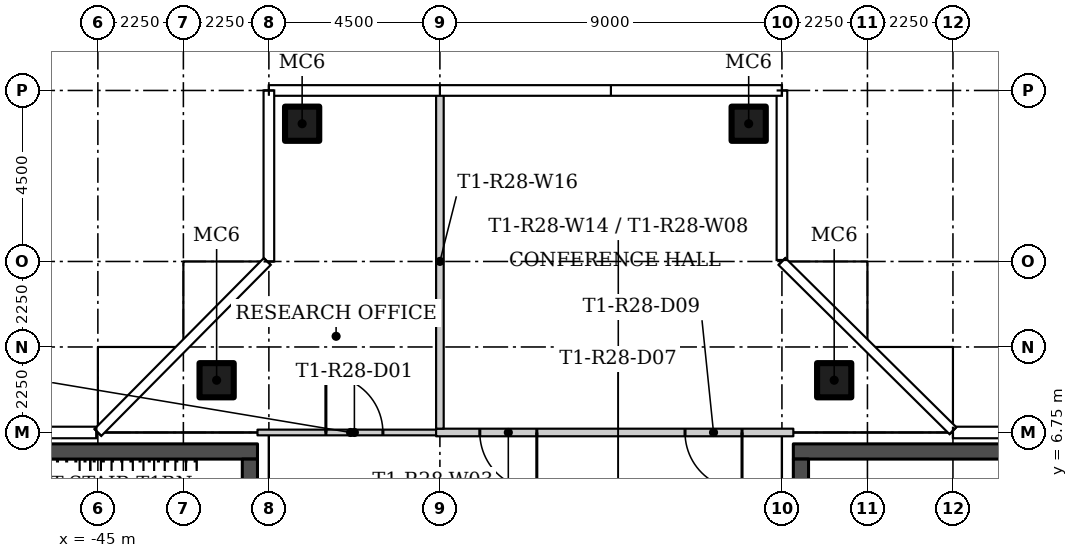
"""IFC4 building model, lengths in metres.
Left out: names, types, materials, properties, quantities, classifications, styles, units other than length and angle.
Written with IfcOpenShell. Run it as: python <this file> out.ifc"""

import sys

from ifc_helpers import new_model, si_unit, direction, frame, frame_2d, origin, origin_2d, place, context, subcontext, project, spatial, rectangle, hollow_rectangle, extrude, element, fill, save


model = new_model("IFC4")
c1 = context("Model", 3, precision=1e-05, world=origin(), true_north=direction((0.0, 1.0)))
c2 = subcontext(c1, "Body", "Model", "MODEL_VIEW")
j1 = project(units=[si_unit("LENGTHUNIT", "METRE"), si_unit("PLANEANGLEUNIT", "RADIAN")], contexts=[c1])
p1 = place(None, origin())
s1 = spatial("IfcSite", under=j1, at=p1, CompositionType="ELEMENT")
p2 = place(p1, origin())
s2 = spatial("IfcBuilding", under=s1, at=p2, CompositionType="ELEMENT")
p3 = place(p2, frame((0.0, 0.0, 257.7)))
s3 = spatial("IfcBuildingStorey", under=s2, at=p3, CompositionType="ELEMENT", Elevation=257.7)
for number, where in (
    (1, (-25.625, 8.125, 0.0)),
    (2, (-41.875, 8.125, 0.0)),
    (3, (-39.625, 14.875, 0.0)),
    (4, (-27.875, 14.875, 0.0)),
):
    element("IfcColumn", number, at=place(p3, frame(where)), inside=s3, PredefinedType="COLUMN", context=c2, shape_type="SweptSolid", body=[
        extrude(hollow_rectangle(XDim=0.9, YDim=0.9, WallThickness=0.036, at=origin_2d()), origin(), (0.0, 0.0, 1.0), 3.55),
    ])
p4 = place(p3, frame((-40.8, 6.75, 0.0)))
e5 = element("IfcWall", 5, at=p4, inside=s3, PredefinedType="PARTITIONING", context=c2, shape_type="SweptSolid", body=[
    extrude(rectangle(XDim=4.9, YDim=0.15, at=frame_2d((2.45, 0.0))), origin(), (0.0, 0.0, 1.0), 3.55),
])
p5 = place(p4, frame((1.8, 0.0, 0.0)))
e6 = element("IfcOpeningElement", 6, at=p5, cuts=e5, PredefinedType="OPENING", context=c2, shape_type="SweptSolid", body=[
    extrude(rectangle(XDim=1.5, YDim=2.1, at=frame_2d((0.75, 1.05))), frame((0.0, 0.085, 0.0), z_axis=(0.0, -1.0, 0.0), x_axis=(1.0, 0.0, 0.0)), (0.0, 0.0, 1.0), 0.17),
])
p6 = place(p3, frame((-26.7, 6.75, 0.0), z_axis=(0.0, 0.0, 1.0), x_axis=(-1.0, 0.0, 0.0)))
e7 = element("IfcWall", 7, at=p6, inside=s3, PredefinedType="PARTITIONING", context=c2, shape_type="SweptSolid", body=[
    extrude(rectangle(XDim=9.4, YDim=0.2, at=frame_2d((4.7, 0.0))), origin(), (0.0, 0.0, 1.0), 3.55),
])
p7 = place(p6, frame((1.35, 0.0, 0.0)))
e8 = element("IfcOpeningElement", 8, at=p7, cuts=e7, PredefinedType="OPENING", context=c2, shape_type="SweptSolid", body=[
    extrude(rectangle(XDim=1.5, YDim=2.4, at=frame_2d((0.75, 1.2))), frame((0.0, 0.11, 0.0), z_axis=(0.0, -1.0, 0.0), x_axis=(1.0, 0.0, 0.0)), (0.0, 0.0, 1.0), 0.22),
])
p8 = place(p6, frame((6.75, 0.0, 0.0)))
e9 = element("IfcOpeningElement", 9, at=p8, cuts=e7, PredefinedType="OPENING", context=c2, shape_type="SweptSolid", body=[
    extrude(rectangle(XDim=1.5, YDim=2.4, at=frame_2d((0.75, 1.2))), frame((0.0, 0.11, 0.0), z_axis=(0.0, -1.0, 0.0), x_axis=(1.0, 0.0, 0.0)), (0.0, 0.0, 1.0), 0.22),
])
p9 = place(p3, frame((-36.0, 6.85, 0.0), z_axis=(0.0, 0.0, 1.0), x_axis=(0.0, 1.0, 0.0)))
e10 = element("IfcWall", 10, at=p9, inside=s3, PredefinedType="PARTITIONING", context=c2, shape_type="SweptSolid", body=[
    extrude(rectangle(XDim=8.805, YDim=0.2, at=frame_2d((4.402, 0.0))), origin(), (0.0, 0.0, 1.0), 3.55),
])
p10 = place(p3, frame((-26.7, 6.25, 0.0)))
e11 = element("IfcWall", 11, at=p10, inside=s3, PredefinedType="SHEAR", context=c2, shape_type="SweptSolid", body=[
    extrude(rectangle(XDim=12.9, YDim=0.4, at=frame_2d((6.45, 0.0))), origin(), (0.0, 0.0, 1.0), 3.55),
])
p11 = place(p3, frame((-26.5, 6.05, 0.0), z_axis=(0.0, 0.0, 1.0), x_axis=(0.0, -1.0, 0.0)))
e12 = element("IfcWall", 12, at=p11, inside=s3, PredefinedType="SHEAR", context=c2, shape_type="SweptSolid", body=[
    extrude(rectangle(XDim=12.1, YDim=0.4, at=frame_2d((6.05, 0.0))), origin(), (0.0, 0.0, 1.0), 3.55),
])
p12 = place(p11, frame((3.9, 0.0, 0.0)))
e13 = element("IfcOpeningElement", 13, at=p12, cuts=e12, PredefinedType="OPENING", context=c2, shape_type="SweptSolid", body=[
    extrude(rectangle(XDim=1.8, YDim=2.4, at=frame_2d((0.9, 1.2))), frame((0.0, 0.21, 0.0), z_axis=(0.0, -1.0, 0.0), x_axis=(1.0, 0.0, 0.0)), (0.0, 0.0, 1.0), 0.42),
])
p13 = place(p3, frame((-40.8, 6.25, 0.0), z_axis=(0.0, 0.0, 1.0), x_axis=(-1.0, 0.0, 0.0)))
e14 = element("IfcWall", 14, at=p13, inside=s3, PredefinedType="SHEAR", context=c2, shape_type="SweptSolid", body=[
    extrude(rectangle(XDim=12.9, YDim=0.4, at=frame_2d((6.45, 0.0))), origin(), (0.0, 0.0, 1.0), 3.55),
])
p14 = place(p3, frame((-41.0, -6.05, 0.0), z_axis=(0.0, 0.0, 1.0), x_axis=(0.0, 1.0, 0.0)))
e15 = element("IfcWall", 15, at=p14, inside=s3, PredefinedType="SHEAR", context=c2, shape_type="SweptSolid", body=[
    extrude(rectangle(XDim=12.1, YDim=0.4, at=frame_2d((6.05, 0.0))), origin(), (0.0, 0.0, 1.0), 3.55),
])
p15 = place(p14, frame((6.4, 0.0, 0.0)))
e16 = element("IfcOpeningElement", 16, at=p15, cuts=e15, PredefinedType="OPENING", context=c2, shape_type="SweptSolid", body=[
    extrude(rectangle(XDim=1.8, YDim=2.4, at=frame_2d((0.9, 1.2))), frame((0.0, 0.21, 0.0), z_axis=(0.0, -1.0, 0.0), x_axis=(1.0, 0.0, 0.0)), (0.0, 0.0, 1.0), 0.42),
])
p16 = place(p5, origin())
e17 = element("IfcDoor", 17, at=p16, inside=s3, OperationType="DOUBLE_DOOR_SINGLE_SWING", PredefinedType="DOOR", context=c2, shape_type="SweptSolid", body=[
    extrude(rectangle(XDim=1.5, YDim=2.1, at=frame_2d((0.75, 1.05))), frame((0.0, 0.025, 0.0), z_axis=(0.0, -1.0, 0.0), x_axis=(1.0, 0.0, 0.0)), (0.0, 0.0, 1.0), 0.05),
])
fill(e6, e17)
p17 = place(p7, origin())
e18 = element("IfcDoor", 18, at=p17, inside=s3, OperationType="DOUBLE_DOOR_SINGLE_SWING", PredefinedType="DOOR", context=c2, shape_type="SweptSolid", body=[
    extrude(rectangle(XDim=1.5, YDim=2.4, at=frame_2d((0.75, 1.2))), frame((0.0, 0.025, 0.0), z_axis=(0.0, -1.0, 0.0), x_axis=(1.0, 0.0, 0.0)), (0.0, 0.0, 1.0), 0.05),
])
fill(e8, e18)
p18 = place(p8, origin())
e19 = element("IfcDoor", 19, at=p18, inside=s3, OperationType="DOUBLE_DOOR_SINGLE_SWING", PredefinedType="DOOR", context=c2, shape_type="SweptSolid", body=[
    extrude(rectangle(XDim=1.5, YDim=2.4, at=frame_2d((0.75, 1.2))), frame((0.0, 0.025, 0.0), z_axis=(0.0, -1.0, 0.0), x_axis=(1.0, 0.0, 0.0)), (0.0, 0.0, 1.0), 0.05),
])
fill(e9, e19)
save(model, sys.argv[1])
